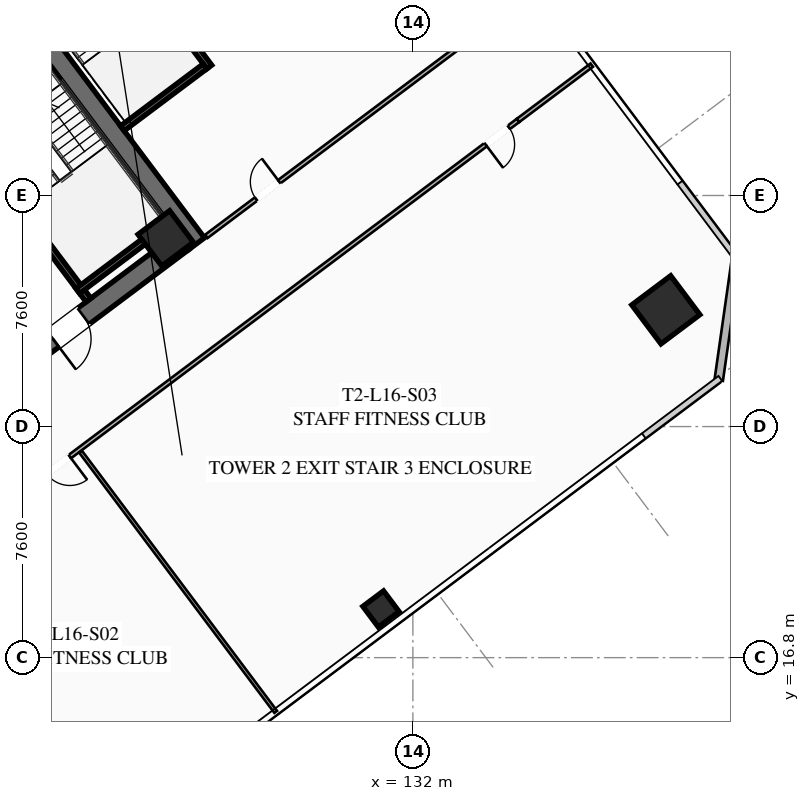
"""IFC4 building model, lengths in metres.
Left out: names, types, materials, properties, quantities, classifications, styles, units other than length and angle.
Written with IfcOpenShell. Run it as: python <this file> out.ifc"""

import sys

from ifc_helpers import new_model, si_unit, direction, frame, frame_2d, origin, origin_2d, place, context, subcontext, project, spatial, rectangle, hollow_rectangle, extrude, element, fill, save


model = new_model("IFC4")
c1 = context("Model", 3, precision=1e-05, world=origin(), true_north=direction((0.0, 1.0)))
c2 = subcontext(c1, "Body", "Model", "MODEL_VIEW")
j1 = project(units=[si_unit("LENGTHUNIT", "METRE"), si_unit("PLANEANGLEUNIT", "RADIAN")], contexts=[c1])
p1 = place(None, origin())
s1 = spatial("IfcSite", under=j1, at=p1, CompositionType="ELEMENT")
p2 = place(p1, origin())
s2 = spatial("IfcBuilding", under=s1, at=p2, CompositionType="ELEMENT")
p3 = place(p2, frame((0.0, 0.0, 63.65)))
s3 = spatial("IfcBuildingStorey", under=s2, at=p3, CompositionType="ELEMENT", Elevation=63.65)
p4 = place(p3, frame((115.524, 42.893, 0.0), z_axis=(0.0, 0.0, 1.0), x_axis=(0.600005007985, -0.799996243986, 0.0)))
e1 = element("IfcWall", 1, at=p4, inside=s3, PredefinedType="SHEAR", context=c2, shape_type="SweptSolid", body=[
    extrude(rectangle(XDim=15.6, YDim=0.65, at=frame_2d((7.8, 0.0))), origin(), (0.0, 0.0, 1.0), 3.55),
])
p5 = place(p3, frame((124.429, 30.478, 0.0), z_axis=(0.0, 0.0, 1.0), x_axis=(-0.799998028465, -0.600002628705, 0.0)))
e2 = element("IfcWall", 2, at=p5, inside=s3, PredefinedType="SHEAR", context=c2, shape_type="SweptSolid", body=[
    extrude(rectangle(XDim=14.86, YDim=0.65, at=frame_2d((7.43, 0.0))), origin(), (0.0, 0.0, 1.0), 3.55),
])
p6 = place(p5, frame((9.13, 0.0, 0.0)))
e3 = element("IfcOpeningElement", 3, at=p6, cuts=e2, PredefinedType="OPENING", context=c2, shape_type="SweptSolid", body=[
    extrude(rectangle(XDim=1.25, YDim=2.25, at=frame_2d((0.625, 1.125))), frame((0.0, 0.335, 0.0), z_axis=(0.0, -1.0, 0.0), x_axis=(1.0, 0.0, 0.0)), (0.0, 0.0, 1.0), 0.67),
])
p7 = place(p5, frame((4.08, 0.0, 0.0)))
e4 = element("IfcOpeningElement", 4, at=p7, cuts=e2, PredefinedType="OPENING", context=c2, shape_type="SweptSolid", body=[
    extrude(rectangle(XDim=1.25, YDim=2.25, at=frame_2d((0.625, 1.125))), frame((0.0, 0.335, 0.0), z_axis=(0.0, -1.0, 0.0), x_axis=(1.0, 0.0, 0.0)), (0.0, 0.0, 1.0), 0.67),
])
p8 = place(p3, frame((123.87, 30.59, 0.0), z_axis=(0.0, 0.0, 1.0), x_axis=(0.799999996291, 0.600000004945, 0.0)))
e5 = element("IfcColumn", 5, at=p8, inside=s3, PredefinedType="COLUMN", context=c2, shape_type="SweptSolid", body=[
    extrude(hollow_rectangle(XDim=1.3, YDim=1.3, WallThickness=0.05, at=origin_2d()), origin(), (0.0, 0.0, 1.0), 3.35),
])
p9 = place(p3, frame((140.32, 28.24, 0.0), z_axis=(0.0, 0.0, 1.0), x_axis=(0.799999996291, 0.600000004945, 0.0)))
e6 = element("IfcColumn", 6, at=p9, inside=s3, PredefinedType="COLUMN", context=c2, shape_type="SweptSolid", body=[
    extrude(hollow_rectangle(XDim=1.6, YDim=1.6, WallThickness=0.06, at=origin_2d()), origin(), (0.0, 0.0, 1.0), 3.35),
])
p10 = place(p3, frame((130.95, 18.4, 0.0), z_axis=(0.0, 0.0, 1.0), x_axis=(0.799999996291, 0.600000004945, 0.0)))
e7 = element("IfcColumn", 7, at=p10, inside=s3, PredefinedType="COLUMN", context=c2, shape_type="SweptSolid", body=[
    extrude(hollow_rectangle(XDim=0.85, YDim=0.85, WallThickness=0.035, at=origin_2d()), origin(), (0.0, 0.0, 1.0), 3.35),
])
p11 = place(p3, frame((142.64, 29.98, 0.0), z_axis=(0.0, 0.0, 1.0), x_axis=(-0.14137968631, -0.989955445613, 0.0)))
e8 = element("IfcWall", 8, at=p11, inside=s3, PredefinedType="SOLIDWALL", context=c2, shape_type="SweptSolid", body=[
    extrude(rectangle(XDim=4.101, YDim=0.28, at=frame_2d((2.051, 0.0))), origin(), (0.0, 0.0, 1.0), 3.35),
])
p12 = place(p3, frame((116.56, 34.92, 0.0), z_axis=(0.0, 0.0, 1.0), x_axis=(0.600009827119, -0.799992629566, 0.0)))
e9 = element("IfcWall", 9, at=p12, inside=s3, PredefinedType="SHEAR", context=c2, shape_type="SweptSolid", body=[
    extrude(rectangle(XDim=7.95, YDim=0.2, at=frame_2d((3.975, 0.0))), origin(), (0.0, 0.0, 1.0), 3.35),
])
p13 = place(p12, frame((0.45, 0.0, 0.0)))
e10 = element("IfcOpeningElement", 10, at=p13, cuts=e9, PredefinedType="OPENING", context=c2, shape_type="SweptSolid", body=[
    extrude(rectangle(XDim=1.15, YDim=2.2, at=frame_2d((0.575, 1.1))), frame((0.0, 0.11, 0.0), z_axis=(0.0, -1.0, 0.0), x_axis=(1.0, 0.0, 0.0)), (0.0, 0.0, 1.0), 0.22),
])
p14 = place(p3, frame((120.98, 28.86, 0.0), z_axis=(0.0, 0.0, 1.0), x_axis=(0.800039270442, 0.59994763584, 0.0)))
e11 = element("IfcWall", 11, at=p14, inside=s3, PredefinedType="SHEAR", context=c2, shape_type="SweptSolid", body=[
    extrude(rectangle(XDim=3.73, YDim=0.2, at=frame_2d((1.865, 0.0))), origin(), (0.0, 0.0, 1.0), 3.35),
])
p15 = place(p3, frame((125.304, 36.228, 0.0), z_axis=(0.0, 0.0, 1.0), x_axis=(-0.59998851072, 0.800008616831, 0.0)))
e12 = element("IfcWall", 12, at=p15, inside=s3, PredefinedType="SHEAR", context=c2, shape_type="SweptSolid", body=[
    extrude(rectangle(XDim=6.8, YDim=0.2, at=frame_2d((3.4, 0.0))), origin(), (0.0, 0.0, 1.0), 3.35),
])
p16 = place(p3, frame((122.444, 34.208, 0.0), z_axis=(0.0, 0.0, 1.0), x_axis=(0.79999138319, 0.600011488909, 0.0)))
e13 = element("IfcWall", 13, at=p16, inside=s3, PredefinedType="SHEAR", context=c2, shape_type="SweptSolid", body=[
    extrude(rectangle(XDim=3.4, YDim=0.2, at=frame_2d((1.7, 0.0))), origin(), (0.0, 0.0, 1.0), 3.35),
])
p17 = place(p3, frame((98.516, 34.012, 0.0), z_axis=(0.0, 0.0, 1.0), x_axis=(0.799998035726, 0.600002619023, 0.0)))
e14 = element("IfcWall", 14, at=p17, inside=s3, PredefinedType="PARTITIONING", context=c2, shape_type="SweptSolid", body=[
    extrude(rectangle(XDim=29.83, YDim=0.135, at=frame_2d((14.915, 0.0))), origin(), (0.0, 0.0, 1.0), 2.493),
])
p18 = place(p17, frame((1.587, 0.0, 0.0)))
e15 = element("IfcOpeningElement", 15, at=p18, cuts=e14, PredefinedType="OPENING", context=c2, shape_type="SweptSolid", body=[
    extrude(rectangle(XDim=0.95, YDim=2.05, at=frame_2d((0.475, 1.025))), frame((0.0, 0.077, 0.0), z_axis=(0.0, -1.0, 0.0), x_axis=(1.0, 0.0, 0.0)), (0.0, 0.0, 1.0), 0.155),
])
p19 = place(p17, frame((28.58, 0.0, 0.0)))
e16 = element("IfcOpeningElement", 16, at=p19, cuts=e14, PredefinedType="OPENING", context=c2, shape_type="SweptSolid", body=[
    extrude(rectangle(XDim=0.95, YDim=2.05, at=frame_2d((0.475, 1.025))), frame((0.0, 0.077, 0.0), z_axis=(0.0, -1.0, 0.0), x_axis=(1.0, 0.0, 0.0)), (0.0, 0.0, 1.0), 0.155),
])
p20 = place(p3, frame((135.46, 34.47, 0.0), z_axis=(0.0, 0.0, 1.0), x_axis=(-0.800000982127, -0.599998690494, 0.0)))
e17 = element("IfcWall", 17, at=p20, inside=s3, PredefinedType="PARTITIONING", context=c2, shape_type="SweptSolid", body=[
    extrude(rectangle(XDim=29.83, YDim=0.135, at=frame_2d((14.915, 0.0))), origin(), (0.0, 0.0, 1.0), 2.493),
])
p21 = place(p20, frame((27.431, 0.0, 0.0)))
e18 = element("IfcOpeningElement", 18, at=p21, cuts=e17, PredefinedType="OPENING", context=c2, shape_type="SweptSolid", body=[
    extrude(rectangle(XDim=0.95, YDim=2.05, at=frame_2d((0.475, 1.025))), frame((0.0, 0.077, 0.0), z_axis=(0.0, -1.0, 0.0), x_axis=(1.0, 0.0, 0.0)), (0.0, 0.0, 1.0), 0.155),
])
p22 = place(p20, frame((18.43, 0.0, 0.0)))
e19 = element("IfcOpeningElement", 19, at=p22, cuts=e17, PredefinedType="OPENING", context=c2, shape_type="SweptSolid", body=[
    extrude(rectangle(XDim=0.95, YDim=2.05, at=frame_2d((0.475, 1.025))), frame((0.0, 0.077, 0.0), z_axis=(0.0, -1.0, 0.0), x_axis=(1.0, 0.0, 0.0)), (0.0, 0.0, 1.0), 0.155),
])
p23 = place(p20, frame((0.38, 0.0, 0.0)))
e20 = element("IfcOpeningElement", 20, at=p23, cuts=e17, PredefinedType="OPENING", context=c2, shape_type="SweptSolid", body=[
    extrude(rectangle(XDim=0.95, YDim=2.05, at=frame_2d((0.475, 1.025))), frame((0.0, 0.077, 0.0), z_axis=(0.0, -1.0, 0.0), x_axis=(1.0, 0.0, 0.0)), (0.0, 0.0, 1.0), 0.155),
])
p24 = place(p3, frame((135.46, 34.47, 0.0), z_axis=(0.0, 0.0, 1.0), x_axis=(0.799990331366, 0.600012891296, 0.0)))
e21 = element("IfcWall", 21, at=p24, inside=s3, PredefinedType="PARTITIONING", context=c2, shape_type="SweptSolid", body=[
    extrude(rectangle(XDim=3.03, YDim=0.135, at=frame_2d((1.515, 0.0))), origin(), (0.0, 0.0, 1.0), 2.493),
])
p25 = place(p3, frame((120.928, 10.096, 0.0), z_axis=(0.0, 0.0, 1.0), x_axis=(-0.599992698573, 0.800005476018, 0.0)))
e22 = element("IfcWall", 22, at=p25, inside=s3, PredefinedType="PARTITIONING", context=c2, shape_type="SweptSolid", body=[
    extrude(rectangle(XDim=10.7, YDim=0.11, at=frame_2d((5.35, 0.0))), origin(), (0.0, 0.0, 1.0), 2.493),
])
p26 = place(p3, frame((127.488, 15.016, 0.0), z_axis=(0.0, 0.0, 1.0), x_axis=(-0.600003650761, 0.799997261916, 0.0)))
e23 = element("IfcWall", 23, at=p26, inside=s3, PredefinedType="PARTITIONING", context=c2, shape_type="SweptSolid", body=[
    extrude(rectangle(XDim=10.7, YDim=0.11, at=frame_2d((5.35, 0.0))), origin(), (0.0, 0.0, 1.0), 2.493),
])
p27 = place(p3, frame((125.208, 30.656, 0.0), z_axis=(0.0, 0.0, 1.0), x_axis=(0.799995666112, 0.600005778473, 0.0)))
e24 = element("IfcWall", 24, at=p27, inside=s3, PredefinedType="PARTITIONING", context=c2, shape_type="SweptSolid", body=[
    extrude(rectangle(XDim=13.52, YDim=0.135, at=frame_2d((6.76, 0.0))), origin(), (0.0, 0.0, 1.0), 2.493),
])
p28 = place(p27, frame((2.045, 0.0, 0.0)))
e25 = element("IfcOpeningElement", 25, at=p28, cuts=e24, PredefinedType="OPENING", context=c2, shape_type="SweptSolid", body=[
    extrude(rectangle(XDim=0.95, YDim=2.05, at=frame_2d((0.475, 1.025))), frame((0.0, 0.077, 0.0), z_axis=(0.0, -1.0, 0.0), x_axis=(1.0, 0.0, 0.0)), (0.0, 0.0, 1.0), 0.155),
])
p29 = place(p7, origin())
e26 = element("IfcDoor", 26, at=p29, inside=s3, OperationType="SINGLE_SWING_RIGHT", PredefinedType="DOOR", context=c2, shape_type="SweptSolid", body=[
    extrude(rectangle(XDim=1.25, YDim=2.25, at=frame_2d((0.625, 1.125))), frame((0.0, 0.025, 0.0), z_axis=(0.0, -1.0, 0.0), x_axis=(1.0, 0.0, 0.0)), (0.0, 0.0, 1.0), 0.05),
])
fill(e4, e26)
p30 = place(p22, origin())
e27 = element("IfcDoor", 27, at=p30, inside=s3, OperationType="SINGLE_SWING_LEFT", PredefinedType="DOOR", context=c2, shape_type="SweptSolid", body=[
    extrude(rectangle(XDim=0.95, YDim=2.05, at=frame_2d((0.475, 1.025))), frame((0.0, 0.025, 0.0), z_axis=(0.0, -1.0, 0.0), x_axis=(1.0, 0.0, 0.0)), (0.0, 0.0, 1.0), 0.05),
])
fill(e19, e27)
p31 = place(p23, origin())
e28 = element("IfcDoor", 28, at=p31, inside=s3, OperationType="SINGLE_SWING_RIGHT", PredefinedType="DOOR", context=c2, shape_type="SweptSolid", body=[
    extrude(rectangle(XDim=0.95, YDim=2.05, at=frame_2d((0.475, 1.025))), frame((0.0, 0.025, 0.0), z_axis=(0.0, -1.0, 0.0), x_axis=(1.0, 0.0, 0.0)), (0.0, 0.0, 1.0), 0.05),
])
fill(e20, e28)
p32 = place(p28, origin())
e29 = element("IfcDoor", 29, at=p32, inside=s3, OperationType="SINGLE_SWING_RIGHT", PredefinedType="DOOR", context=c2, shape_type="SweptSolid", body=[
    extrude(rectangle(XDim=0.95, YDim=2.05, at=frame_2d((0.475, 1.025))), frame((0.0, 0.025, 0.0), z_axis=(0.0, -1.0, 0.0), x_axis=(1.0, 0.0, 0.0)), (0.0, 0.0, 1.0), 0.05),
])
fill(e25, e29)
save(model, sys.argv[1])
